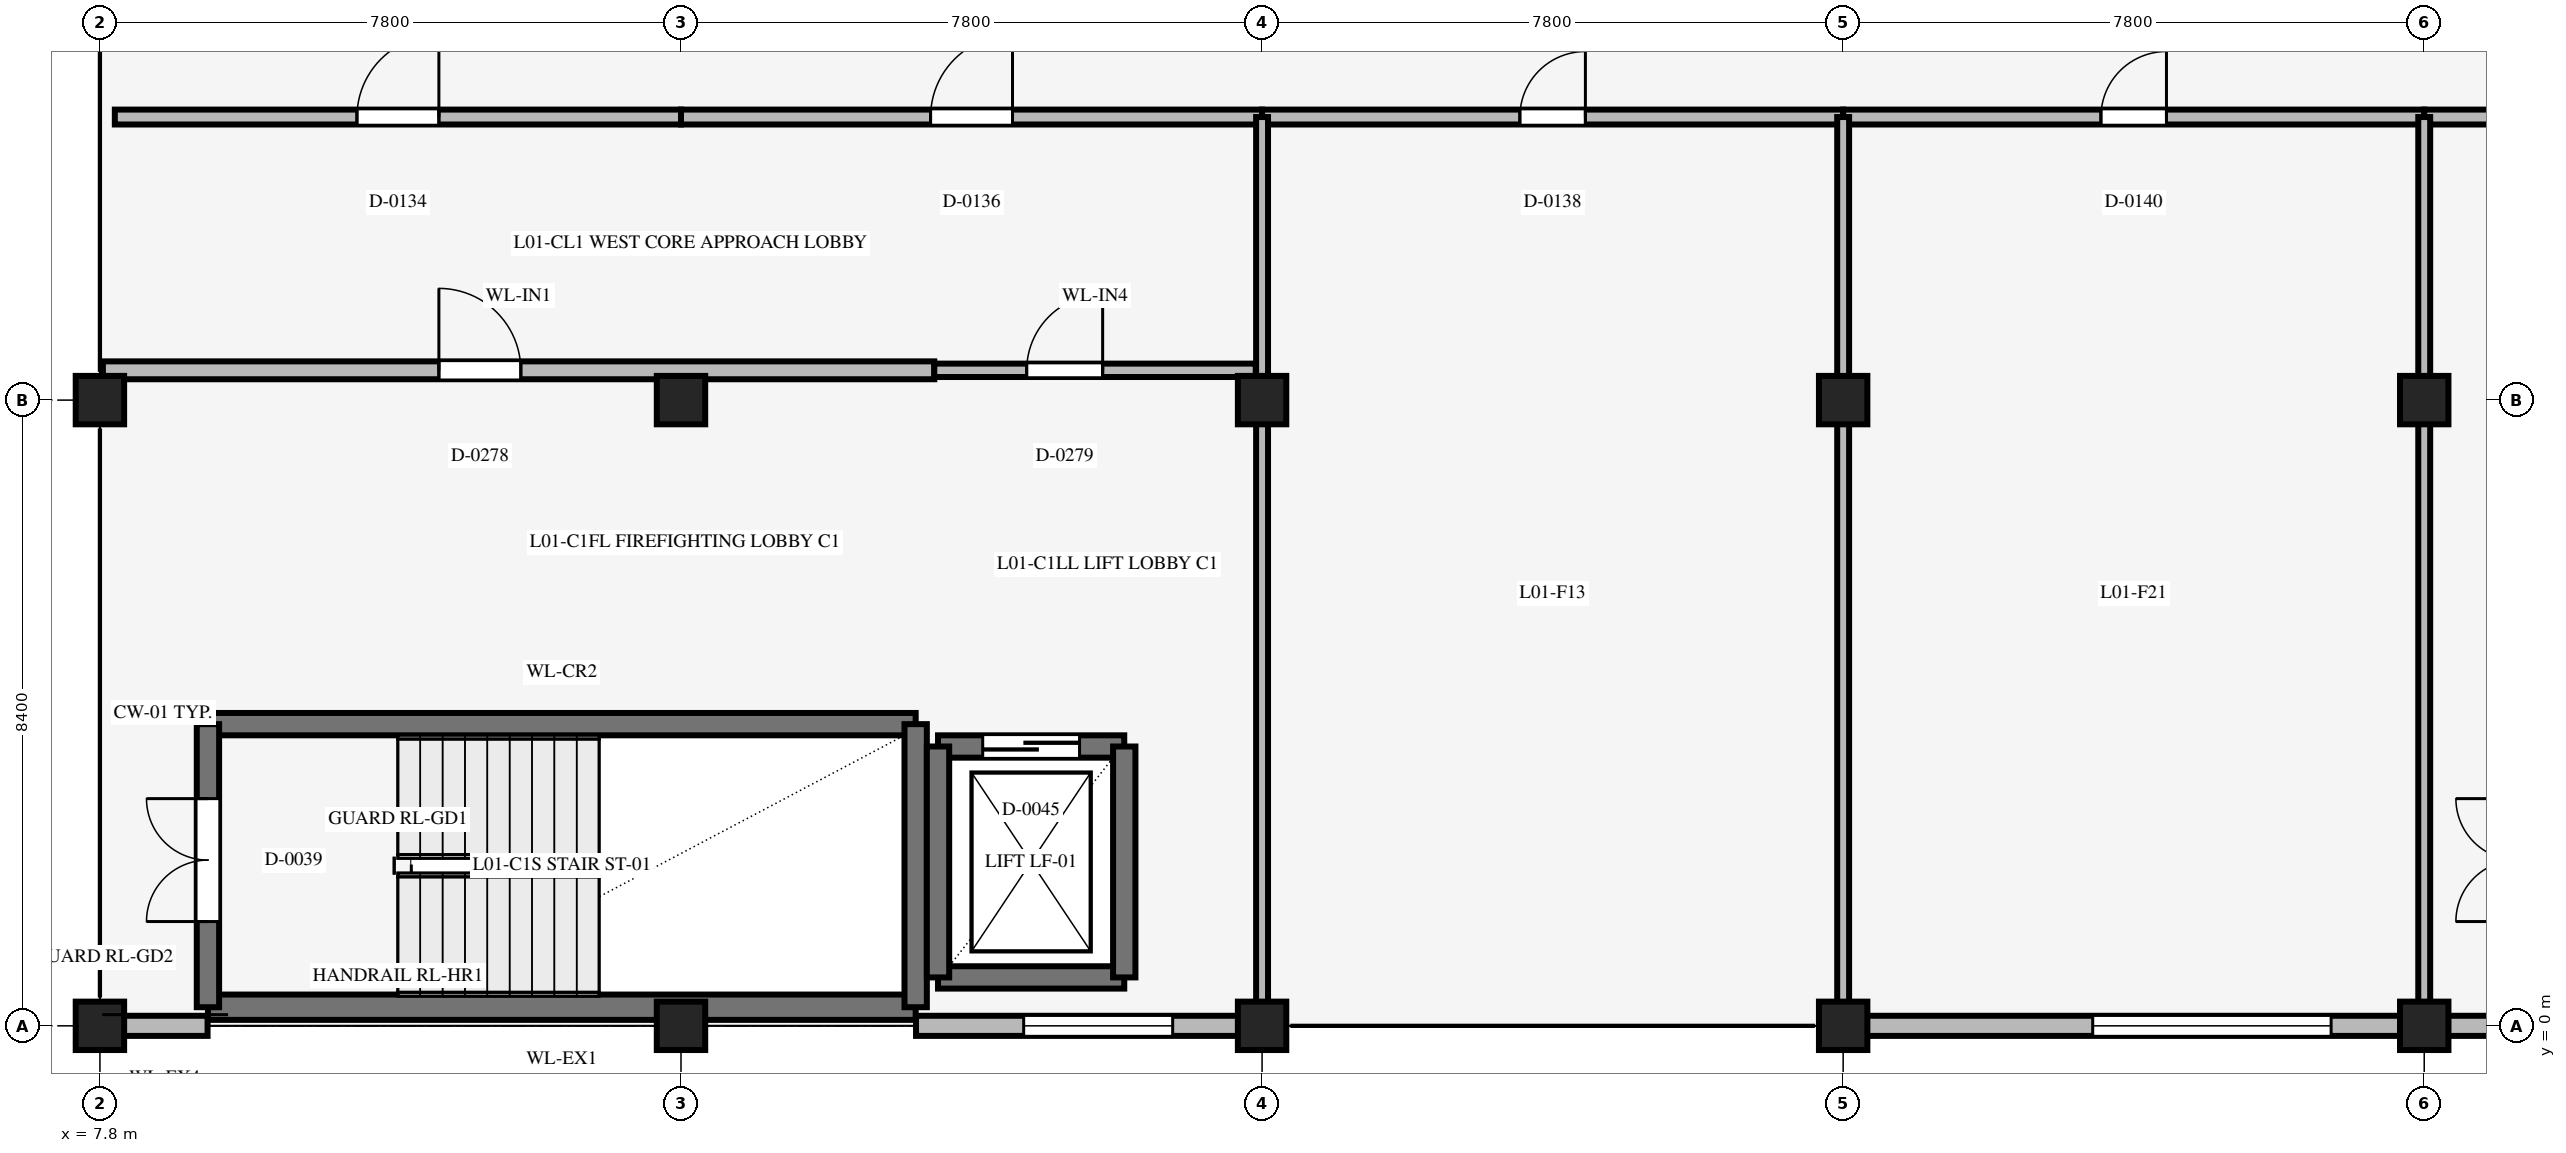
"""IFC4 building model, lengths in metres.
Left out: names, types, materials, properties, quantities, classifications, styles, units other than length and angle.
Written with IfcOpenShell. Run it as: python <this file> out.ifc"""

import sys

from ifc_helpers import new_model, si_unit, direction, frame, frame_2d, origin, origin_2d, place, context, subcontext, project, spatial, rectangle, extrude, element, fill, save


model = new_model("IFC4")
c1 = context("Model", 3, precision=1e-05, world=origin(), true_north=direction((0.0, 1.0)))
c2 = subcontext(c1, "Body", "Model", "MODEL_VIEW")
j1 = project(units=[si_unit("LENGTHUNIT", "METRE"), si_unit("PLANEANGLEUNIT", "RADIAN")], contexts=[c1])
p1 = place(None, origin())
s1 = spatial("IfcSite", under=j1, at=p1, CompositionType="ELEMENT")
p2 = place(p1, origin())
s2 = spatial("IfcBuilding", under=s1, at=p2, CompositionType="ELEMENT")
p3 = place(p2, frame((0.0, 0.0, 6.0)))
s3 = spatial("IfcBuildingStorey", under=s2, at=p3, CompositionType="ELEMENT", Elevation=6.0)
for number, where, z_axis, x_axis in (
    (1, (7.8, 0.0, 0.0), (0.0, 0.0, 1.0), (1.0, 0.0, 0.0)),
    (2, (7.8, 8.4, 0.0), (0.0, 0.0, 1.0), (1.0, 0.0, 0.0)),
    (3, (15.6, 0.0, 0.0), (0.0, 0.0, 1.0), (1.0, 0.0, 0.0)),
    (4, (15.6, 8.4, 0.0), (0.0, 0.0, 1.0), (1.0, 0.0, 0.0)),
    (5, (23.4, 0.0, 0.0), (0.0, 0.0, 1.0), (1.0, 0.0, 0.0)),
    (6, (23.4, 8.4, 0.0), (0.0, 0.0, 1.0), (1.0, 0.0, 0.0)),
    (7, (31.2, 0.0, 0.0), (0.0, 0.0, 1.0), (1.0, 0.0, 0.0)),
    (8, (31.2, 8.4, 0.0), (0.0, 0.0, 1.0), (1.0, 0.0, 0.0)),
    (9, (39.0, 0.0, 0.0), (0.0, 0.0, 1.0), (1.0, 0.0, 0.0)),
    (10, (39.0, 8.4, 0.0), (0.0, 0.0, 1.0), (1.0, 0.0, 0.0)),
):
    element("IfcColumn", number, at=place(p3, frame(where, z_axis=z_axis, x_axis=x_axis)), inside=s3, PredefinedType="COLUMN", context=c2, shape_type="SweptSolid", body=[
        extrude(rectangle(XDim=0.65, YDim=0.65, at=origin_2d()), origin(), (0.0, 0.0, 1.0), 6.0),
    ])
p4 = place(p3, frame((18.75, 0.25, 0.0), z_axis=(0.0, 0.0, 1.0), x_axis=(-1.0, 0.0, 0.0)))
e11 = element("IfcWall", 11, at=p4, inside=s3, PredefinedType="STANDARD", context=c2, shape_type="SweptSolid", body=[
    extrude(rectangle(XDim=9.5, YDim=0.34, at=frame_2d((4.75, 0.0))), origin(), (0.0, 0.0, 1.0), 6.0),
])
p5 = place(p3, frame((9.25, 4.05, 0.0), z_axis=(0.0, 0.0, 1.0), x_axis=(1.0, 0.0, 0.0)))
e12 = element("IfcWall", 12, at=p5, inside=s3, PredefinedType="SHEAR", context=c2, shape_type="SweptSolid", body=[
    extrude(rectangle(XDim=9.5, YDim=0.3, at=frame_2d((4.75, 0.0))), origin(), (0.0, 0.0, 1.0), 6.0),
])
p6 = place(p3, frame((9.25, 0.25, 0.0), z_axis=(0.0, 0.0, 1.0), x_axis=(0.0, 1.0, 0.0)))
e13 = element("IfcWall", 13, at=p6, inside=s3, PredefinedType="SHEAR", context=c2, shape_type="SweptSolid", body=[
    extrude(rectangle(XDim=3.8, YDim=0.3, at=frame_2d((1.9, 0.0))), origin(), (0.0, 0.0, 1.0), 6.0),
])
p7 = place(p6, frame((1.15, 0.0, 0.0)))
e14 = element("IfcOpeningElement", 14, at=p7, cuts=e13, PredefinedType="OPENING", context=c2, shape_type="SweptSolid", body=[
    extrude(rectangle(XDim=1.65, YDim=2.2, at=frame_2d((0.825, 1.1))), frame((0.0, 0.16, 0.0), z_axis=(0.0, -1.0, 0.0), x_axis=(1.0, 0.0, 0.0)), (0.0, 0.0, 1.0), 0.32),
])
p8 = place(p3, frame((18.75, 0.25, 0.0), z_axis=(0.0, 0.0, 1.0), x_axis=(0.0, 1.0, 0.0)))
e15 = element("IfcWall", 15, at=p8, inside=s3, PredefinedType="SHEAR", context=c2, shape_type="SweptSolid", body=[
    extrude(rectangle(XDim=3.8, YDim=0.3, at=frame_2d((1.9, 0.0))), origin(), (0.0, 0.0, 1.0), 6.0),
])
p9 = place(p3, frame((19.05, 0.65, 0.0), z_axis=(0.0, 0.0, 1.0), x_axis=(1.0, 0.0, 0.0)))
e16 = element("IfcWall", 16, at=p9, inside=s3, PredefinedType="SHEAR", context=c2, shape_type="SweptSolid", body=[
    extrude(rectangle(XDim=2.5, YDim=0.3, at=frame_2d((1.25, 0.0))), origin(), (0.0, 0.0, 1.0), 5.64),
])
p10 = place(p3, frame((19.05, 3.75, 0.0), z_axis=(0.0, 0.0, 1.0), x_axis=(1.0, 0.0, 0.0)))
e17 = element("IfcWall", 17, at=p10, inside=s3, PredefinedType="SHEAR", context=c2, shape_type="SweptSolid", body=[
    extrude(rectangle(XDim=2.5, YDim=0.3, at=frame_2d((1.25, 0.0))), origin(), (0.0, 0.0, 1.0), 5.64),
])
p11 = place(p10, frame((0.6, 0.0, 0.0)))
e18 = element("IfcOpeningElement", 18, at=p11, cuts=e17, PredefinedType="OPENING", context=c2, shape_type="SweptSolid", body=[
    extrude(rectangle(XDim=1.3, YDim=2.2, at=frame_2d((0.65, 1.1))), frame((0.0, 0.16, 0.0), z_axis=(0.0, -1.0, 0.0), x_axis=(1.0, 0.0, 0.0)), (0.0, 0.0, 1.0), 0.32),
])
for number, where, z_axis, x_axis in (
    (19, (19.05, 0.65, 0.0), (0.0, 0.0, 1.0), (0.0, 1.0, 0.0)),
    (20, (21.55, 0.65, 0.0), (0.0, 0.0, 1.0), (0.0, 1.0, 0.0)),
):
    element("IfcWall", number, at=place(p3, frame(where, z_axis=z_axis, x_axis=x_axis)), inside=s3, PredefinedType="SHEAR", context=c2, shape_type="SweptSolid", body=[
        extrude(rectangle(XDim=3.1, YDim=0.3, at=frame_2d((1.55, 0.0))), origin(), (0.0, 0.0, 1.0), 5.64),
    ])
p12 = place(p3, frame((9.245, 0.0, 0.0), z_axis=(0.0, 0.0, 1.0), x_axis=(-1.0, 0.0, 0.0)))
e21 = element("IfcWall", 21, at=p12, inside=s3, PredefinedType="STANDARD", context=c2, shape_type="SweptSolid", body=[
    extrude(rectangle(XDim=1.145, YDim=0.27, at=frame_2d((0.573, 0.0))), origin(), (0.0, 0.0, 1.0), 5.72),
])
p13 = place(p3, frame((23.085, 0.0, 0.0), z_axis=(0.0, 0.0, 1.0), x_axis=(-1.0, 0.0, 0.0)))
e22 = element("IfcWall", 22, at=p13, inside=s3, PredefinedType="STANDARD", context=c2, shape_type="SweptSolid", body=[
    extrude(rectangle(XDim=4.33, YDim=0.27, at=frame_2d((2.165, 0.0))), origin(), (0.0, 0.0, 1.0), 5.72),
])
p14 = place(p13, frame((0.885, 0.0, 1.2)))
e23 = element("IfcOpeningElement", 23, at=p14, cuts=e22, PredefinedType="OPENING", context=c2, shape_type="SweptSolid", body=[
    extrude(rectangle(XDim=2.0, YDim=0.9, at=frame_2d((1.0, 0.45))), frame((0.0, 0.145, 0.0), z_axis=(0.0, -1.0, 0.0), x_axis=(1.0, 0.0, 0.0)), (0.0, 0.0, 1.0), 0.29),
])
p15 = place(p3, frame((38.685, 0.0, 0.0), z_axis=(0.0, 0.0, 1.0), x_axis=(-1.0, 0.0, 0.0)))
e24 = element("IfcWall", 24, at=p15, inside=s3, PredefinedType="STANDARD", context=c2, shape_type="SweptSolid", body=[
    extrude(rectangle(XDim=7.17, YDim=0.27, at=frame_2d((3.585, 0.0))), origin(), (0.0, 0.0, 1.0), 5.371),
])
p16 = place(p15, frame((0.935, 0.0, 0.9)))
e25 = element("IfcOpeningElement", 25, at=p16, cuts=e24, PredefinedType="OPENING", context=c2, shape_type="SweptSolid", body=[
    extrude(rectangle(XDim=3.2, YDim=2.1, at=frame_2d((1.6, 1.05))), frame((0.0, 0.145, 0.0), z_axis=(0.0, -1.0, 0.0), x_axis=(1.0, 0.0, 0.0)), (0.0, 0.0, 1.0), 0.29),
])
p17 = place(p3, frame((40.245, 0.0, 0.0), z_axis=(0.0, 0.0, 1.0), x_axis=(-1.0, 0.0, 0.0)))
e26 = element("IfcWall", 26, at=p17, inside=s3, PredefinedType="STANDARD", context=c2, shape_type="SweptSolid", body=[
    extrude(rectangle(XDim=0.925, YDim=0.27, at=frame_2d((0.462, 0.0))), origin(), (0.0, 0.0, 1.0), 5.72),
])
p18 = place(p3, frame((8.0, 12.2, 0.0), z_axis=(0.0, 0.0, 1.0), x_axis=(1.0, 0.0, 0.0)))
e27 = element("IfcWall", 27, at=p18, inside=s3, PredefinedType="STANDARD", context=c2, shape_type="SweptSolid", body=[
    extrude(rectangle(XDim=7.6, YDim=0.2, at=frame_2d((3.8, 0.0))), origin(), (0.0, 0.0, 1.0), 3.15),
])
p19 = place(p18, frame((3.25, 0.0, 0.0)))
e28 = element("IfcOpeningElement", 28, at=p19, cuts=e27, PredefinedType="OPENING", context=c2, shape_type="SweptSolid", body=[
    extrude(rectangle(XDim=1.1, YDim=2.2, at=frame_2d((0.55, 1.1))), frame((0.0, 0.11, 0.0), z_axis=(0.0, -1.0, 0.0), x_axis=(1.0, 0.0, 0.0)), (0.0, 0.0, 1.0), 0.22),
])
p20 = place(p3, frame((15.6, 12.2, 0.0), z_axis=(0.0, 0.0, 1.0), x_axis=(1.0, 0.0, 0.0)))
e29 = element("IfcWall", 29, at=p20, inside=s3, PredefinedType="STANDARD", context=c2, shape_type="SweptSolid", body=[
    extrude(rectangle(XDim=7.8, YDim=0.2, at=frame_2d((3.9, 0.0))), origin(), (0.0, 0.0, 1.0), 3.15),
])
p21 = place(p20, frame((3.35, 0.0, 0.0)))
e30 = element("IfcOpeningElement", 30, at=p21, cuts=e29, PredefinedType="OPENING", context=c2, shape_type="SweptSolid", body=[
    extrude(rectangle(XDim=1.1, YDim=2.2, at=frame_2d((0.55, 1.1))), frame((0.0, 0.11, 0.0), z_axis=(0.0, -1.0, 0.0), x_axis=(1.0, 0.0, 0.0)), (0.0, 0.0, 1.0), 0.22),
])
p22 = place(p3, frame((23.4, 12.2, 0.0), z_axis=(0.0, 0.0, 1.0), x_axis=(1.0, 0.0, 0.0)))
e31 = element("IfcWall", 31, at=p22, inside=s3, PredefinedType="STANDARD", context=c2, shape_type="SweptSolid", body=[
    extrude(rectangle(XDim=7.8, YDim=0.2, at=frame_2d((3.9, 0.0))), origin(), (0.0, 0.0, 1.0), 3.15),
])
p23 = place(p22, frame((3.46, 0.0, 0.0)))
e32 = element("IfcOpeningElement", 32, at=p23, cuts=e31, PredefinedType="OPENING", context=c2, shape_type="SweptSolid", body=[
    extrude(rectangle(XDim=0.88, YDim=2.1, at=frame_2d((0.44, 1.05))), frame((0.0, 0.11, 0.0), z_axis=(0.0, -1.0, 0.0), x_axis=(1.0, 0.0, 0.0)), (0.0, 0.0, 1.0), 0.22),
])
p24 = place(p3, frame((31.2, 12.2, 0.0), z_axis=(0.0, 0.0, 1.0), x_axis=(1.0, 0.0, 0.0)))
e33 = element("IfcWall", 33, at=p24, inside=s3, PredefinedType="STANDARD", context=c2, shape_type="SweptSolid", body=[
    extrude(rectangle(XDim=7.8, YDim=0.2, at=frame_2d((3.9, 0.0))), origin(), (0.0, 0.0, 1.0), 3.15),
])
p25 = place(p24, frame((3.46, 0.0, 0.0)))
e34 = element("IfcOpeningElement", 34, at=p25, cuts=e33, PredefinedType="OPENING", context=c2, shape_type="SweptSolid", body=[
    extrude(rectangle(XDim=0.88, YDim=2.1, at=frame_2d((0.44, 1.05))), frame((0.0, 0.11, 0.0), z_axis=(0.0, -1.0, 0.0), x_axis=(1.0, 0.0, 0.0)), (0.0, 0.0, 1.0), 0.22),
])
p26 = place(p3, frame((39.0, 12.2, 0.0), z_axis=(0.0, 0.0, 1.0), x_axis=(1.0, 0.0, 0.0)))
e35 = element("IfcWall", 35, at=p26, inside=s3, PredefinedType="STANDARD", context=c2, shape_type="SweptSolid", body=[
    extrude(rectangle(XDim=7.8, YDim=0.2, at=frame_2d((3.9, 0.0))), origin(), (0.0, 0.0, 1.0), 3.15),
])
p27 = place(p26, frame((3.46, 0.0, 0.0)))
e36 = element("IfcOpeningElement", 36, at=p27, cuts=e35, PredefinedType="OPENING", context=c2, shape_type="SweptSolid", body=[
    extrude(rectangle(XDim=0.88, YDim=2.1, at=frame_2d((0.44, 1.05))), frame((0.0, 0.11, 0.0), z_axis=(0.0, -1.0, 0.0), x_axis=(1.0, 0.0, 0.0)), (0.0, 0.0, 1.0), 0.22),
])
p28 = place(p3, frame((23.4, 0.3, 0.0), z_axis=(0.0, 0.0, 1.0), x_axis=(0.0, 1.0, 0.0)))
e37 = element("IfcWall", 37, at=p28, inside=s3, PredefinedType="STANDARD", context=c2, shape_type="SweptSolid", body=[
    extrude(rectangle(XDim=7.8, YDim=0.16, at=frame_2d((3.9, 0.0))), origin(), (0.0, 0.0, 1.0), 3.15),
])
p29 = place(p3, frame((23.4, 8.7, 0.0), z_axis=(0.0, 0.0, 1.0), x_axis=(0.0, 1.0, 0.0)))
e38 = element("IfcWall", 38, at=p29, inside=s3, PredefinedType="STANDARD", context=c2, shape_type="SweptSolid", body=[
    extrude(rectangle(XDim=3.5, YDim=0.16, at=frame_2d((1.75, 0.0))), origin(), (0.0, 0.0, 1.0), 3.15),
])
p30 = place(p3, frame((31.2, 0.3, 0.0), z_axis=(0.0, 0.0, 1.0), x_axis=(0.0, 1.0, 0.0)))
e39 = element("IfcWall", 39, at=p30, inside=s3, PredefinedType="STANDARD", context=c2, shape_type="SweptSolid", body=[
    extrude(rectangle(XDim=7.8, YDim=0.16, at=frame_2d((3.9, 0.0))), origin(), (0.0, 0.0, 1.0), 3.15),
])
p31 = place(p3, frame((31.2, 8.7, 0.0), z_axis=(0.0, 0.0, 1.0), x_axis=(0.0, 1.0, 0.0)))
e40 = element("IfcWall", 40, at=p31, inside=s3, PredefinedType="STANDARD", context=c2, shape_type="SweptSolid", body=[
    extrude(rectangle(XDim=3.5, YDim=0.16, at=frame_2d((1.75, 0.0))), origin(), (0.0, 0.0, 1.0), 3.15),
])
p32 = place(p3, frame((39.0, 0.3, 0.0), z_axis=(0.0, 0.0, 1.0), x_axis=(0.0, 1.0, 0.0)))
e41 = element("IfcWall", 41, at=p32, inside=s3, PredefinedType="STANDARD", context=c2, shape_type="SweptSolid", body=[
    extrude(rectangle(XDim=7.8, YDim=0.16, at=frame_2d((3.9, 0.0))), origin(), (0.0, 0.0, 1.0), 3.15),
])
p33 = place(p3, frame((39.0, 8.7, 0.0), z_axis=(0.0, 0.0, 1.0), x_axis=(0.0, 1.0, 0.0)))
e42 = element("IfcWall", 42, at=p33, inside=s3, PredefinedType="STANDARD", context=c2, shape_type="SweptSolid", body=[
    extrude(rectangle(XDim=3.5, YDim=0.16, at=frame_2d((1.75, 0.0))), origin(), (0.0, 0.0, 1.0), 3.15),
])
p34 = place(p3, frame((7.84, 8.8, 0.0), z_axis=(0.0, 0.0, 1.0), x_axis=(1.0, 0.0, 0.0)))
e43 = element("IfcWall", 43, at=p34, inside=s3, PredefinedType="STANDARD", context=c2, shape_type="SweptSolid", body=[
    extrude(rectangle(XDim=11.16, YDim=0.24, at=frame_2d((5.58, 0.0))), origin(), (0.0, 0.0, 1.0), 3.15),
])
p35 = place(p34, frame((4.51, 0.0, 0.0)))
e44 = element("IfcOpeningElement", 44, at=p35, cuts=e43, PredefinedType="OPENING", context=c2, shape_type="SweptSolid", body=[
    extrude(rectangle(XDim=1.1, YDim=2.2, at=frame_2d((0.55, 1.1))), frame((0.0, 0.13, 0.0), z_axis=(0.0, -1.0, 0.0), x_axis=(1.0, 0.0, 0.0)), (0.0, 0.0, 1.0), 0.26),
])
p36 = place(p3, frame((19.0, 8.8, 0.0), z_axis=(0.0, 0.0, 1.0), x_axis=(1.0, 0.0, 0.0)))
e45 = element("IfcWall", 45, at=p36, inside=s3, PredefinedType="STANDARD", context=c2, shape_type="SweptSolid", body=[
    extrude(rectangle(XDim=4.315, YDim=0.18, at=frame_2d((2.157, 0.0))), origin(), (0.0, 0.0, 1.0), 3.15),
])
p37 = place(p36, frame((1.24, 0.0, 0.0)))
e46 = element("IfcOpeningElement", 46, at=p37, cuts=e45, PredefinedType="OPENING", context=c2, shape_type="SweptSolid", body=[
    extrude(rectangle(XDim=1.02, YDim=2.15, at=frame_2d((0.51, 1.075))), frame((0.0, 0.1, 0.0), z_axis=(0.0, -1.0, 0.0), x_axis=(1.0, 0.0, 0.0)), (0.0, 0.0, 1.0), 0.2),
])
p38 = place(p14, origin())
e47 = element("IfcWindow", 47, at=p38, inside=s3, PartitioningType="SINGLE_PANEL", PredefinedType="WINDOW", context=c2, shape_type="SweptSolid", body=[
    extrude(rectangle(XDim=2.0, YDim=0.9, at=frame_2d((1.0, 0.45))), frame((0.0, 0.03, 0.0), z_axis=(0.0, -1.0, 0.0), x_axis=(1.0, 0.0, 0.0)), (0.0, 0.0, 1.0), 0.06),
])
fill(e23, e47)
p39 = place(p16, origin())
e48 = element("IfcWindow", 48, at=p39, inside=s3, PartitioningType="SINGLE_PANEL", PredefinedType="WINDOW", context=c2, shape_type="SweptSolid", body=[
    extrude(rectangle(XDim=3.2, YDim=2.1, at=frame_2d((1.6, 1.05))), frame((0.0, 0.03, 0.0), z_axis=(0.0, -1.0, 0.0), x_axis=(1.0, 0.0, 0.0)), (0.0, 0.0, 1.0), 0.06),
])
fill(e25, e48)
p40 = place(p7, origin())
e49 = element("IfcDoor", 49, at=p40, inside=s3, OperationType="DOUBLE_DOOR_SINGLE_SWING", PredefinedType="DOOR", context=c2, shape_type="SweptSolid", body=[
    extrude(rectangle(XDim=1.65, YDim=2.2, at=frame_2d((0.825, 1.1))), frame((0.0, 0.025, 0.0), z_axis=(0.0, -1.0, 0.0), x_axis=(1.0, 0.0, 0.0)), (0.0, 0.0, 1.0), 0.05),
])
fill(e14, e49)
p41 = place(p11, origin())
e50 = element("IfcDoor", 50, at=p41, inside=s3, OperationType="DOUBLE_DOOR_SLIDING", PredefinedType="DOOR", context=c2, shape_type="SweptSolid", body=[
    extrude(rectangle(XDim=1.3, YDim=2.2, at=frame_2d((0.65, 1.1))), frame((0.0, 0.025, 0.0), z_axis=(0.0, -1.0, 0.0), x_axis=(1.0, 0.0, 0.0)), (0.0, 0.0, 1.0), 0.05),
])
fill(e18, e50)
p42 = place(p19, origin())
e51 = element("IfcDoor", 51, at=p42, inside=s3, OperationType="SINGLE_SWING_RIGHT", PredefinedType="DOOR", context=c2, shape_type="SweptSolid", body=[
    extrude(rectangle(XDim=1.1, YDim=2.2, at=frame_2d((0.55, 1.1))), frame((0.0, 0.025, 0.0), z_axis=(0.0, -1.0, 0.0), x_axis=(1.0, 0.0, 0.0)), (0.0, 0.0, 1.0), 0.05),
])
fill(e28, e51)
p43 = place(p21, origin())
e52 = element("IfcDoor", 52, at=p43, inside=s3, OperationType="SINGLE_SWING_RIGHT", PredefinedType="DOOR", context=c2, shape_type="SweptSolid", body=[
    extrude(rectangle(XDim=1.1, YDim=2.2, at=frame_2d((0.55, 1.1))), frame((0.0, 0.025, 0.0), z_axis=(0.0, -1.0, 0.0), x_axis=(1.0, 0.0, 0.0)), (0.0, 0.0, 1.0), 0.05),
])
fill(e30, e52)
p44 = place(p23, origin())
e53 = element("IfcDoor", 53, at=p44, inside=s3, OperationType="SINGLE_SWING_RIGHT", PredefinedType="DOOR", context=c2, shape_type="SweptSolid", body=[
    extrude(rectangle(XDim=0.88, YDim=2.1, at=frame_2d((0.44, 1.05))), frame((0.0, 0.025, 0.0), z_axis=(0.0, -1.0, 0.0), x_axis=(1.0, 0.0, 0.0)), (0.0, 0.0, 1.0), 0.05),
])
fill(e32, e53)
p45 = place(p25, origin())
e54 = element("IfcDoor", 54, at=p45, inside=s3, OperationType="SINGLE_SWING_RIGHT", PredefinedType="DOOR", context=c2, shape_type="SweptSolid", body=[
    extrude(rectangle(XDim=0.88, YDim=2.1, at=frame_2d((0.44, 1.05))), frame((0.0, 0.025, 0.0), z_axis=(0.0, -1.0, 0.0), x_axis=(1.0, 0.0, 0.0)), (0.0, 0.0, 1.0), 0.05),
])
fill(e34, e54)
p46 = place(p35, origin())
e55 = element("IfcDoor", 55, at=p46, inside=s3, OperationType="SINGLE_SWING_LEFT", PredefinedType="DOOR", context=c2, shape_type="SweptSolid", body=[
    extrude(rectangle(XDim=1.1, YDim=2.2, at=frame_2d((0.55, 1.1))), frame((0.0, 0.025, 0.0), z_axis=(0.0, -1.0, 0.0), x_axis=(1.0, 0.0, 0.0)), (0.0, 0.0, 1.0), 0.05),
])
fill(e44, e55)
p47 = place(p37, origin())
e56 = element("IfcDoor", 56, at=p47, inside=s3, OperationType="SINGLE_SWING_RIGHT", PredefinedType="DOOR", context=c2, shape_type="SweptSolid", body=[
    extrude(rectangle(XDim=1.02, YDim=2.15, at=frame_2d((0.51, 1.075))), frame((0.0, 0.025, 0.0), z_axis=(0.0, -1.0, 0.0), x_axis=(1.0, 0.0, 0.0)), (0.0, 0.0, 1.0), 0.05),
])
fill(e46, e56)
save(model, sys.argv[1])
